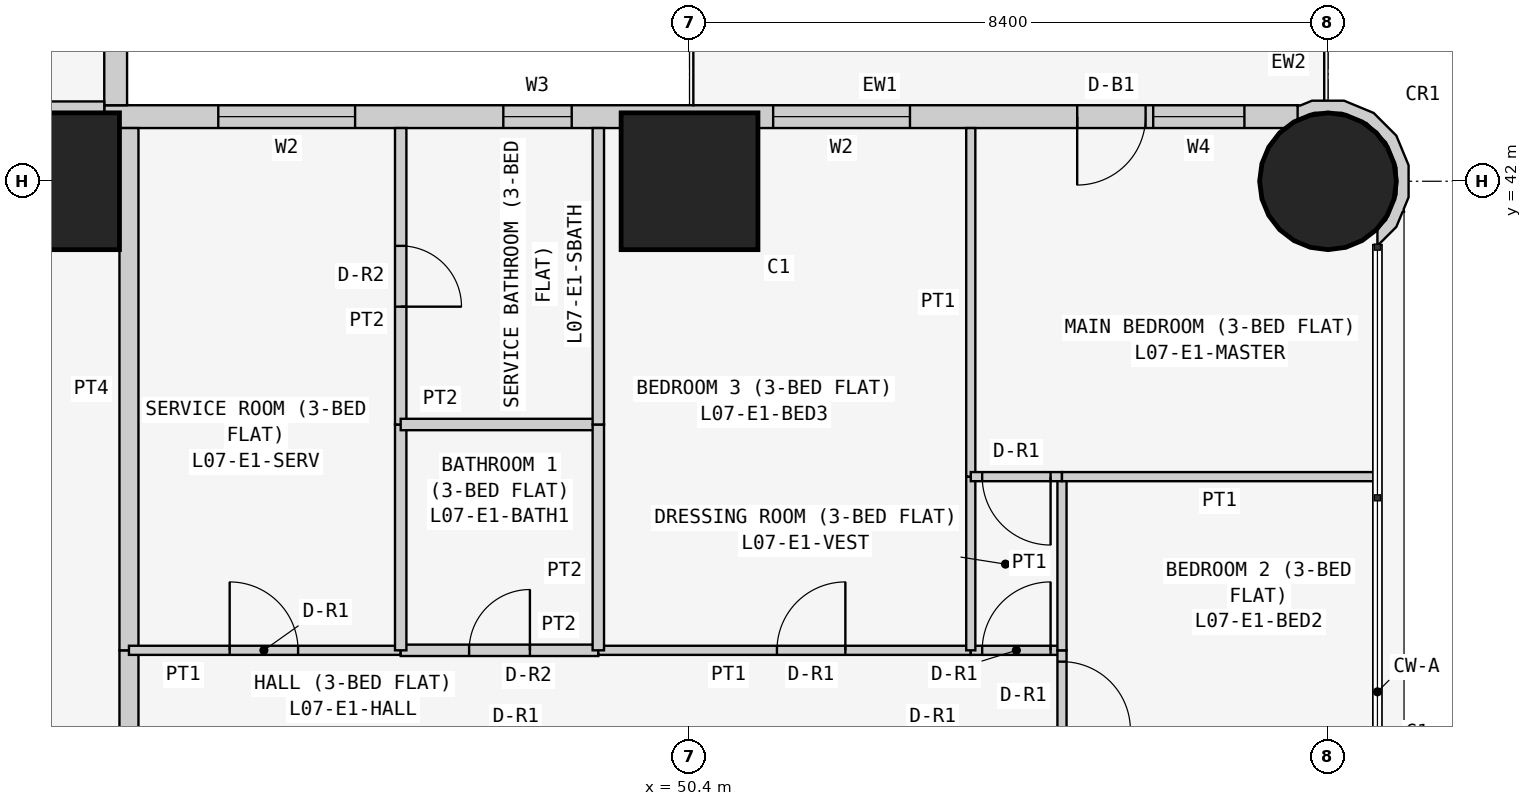
"""IFC4 building model, lengths in metres.
Left out: names, types, materials, properties, quantities, classifications, styles, units other than length and angle.
Written with IfcOpenShell. Run it as: python <this file> out.ifc"""

import sys

from ifc_helpers import new_model, si_unit, direction, frame, frame_2d, origin, origin_2d, place, context, subcontext, project, spatial, polyline, rectangle, circle, outline, extrude, element, fill, save


model = new_model("IFC4")
c1 = context("Model", 3, precision=1e-05, world=origin(), true_north=direction((0.0, 1.0)))
c2 = subcontext(c1, "Body", "Model", "MODEL_VIEW")
j1 = project(units=[si_unit("LENGTHUNIT", "METRE"), si_unit("PLANEANGLEUNIT", "RADIAN")], contexts=[c1])
p1 = place(None, origin())
s1 = spatial("IfcSite", under=j1, at=p1, CompositionType="ELEMENT")
p2 = place(p1, origin())
s2 = spatial("IfcBuilding", under=s1, at=p2, CompositionType="ELEMENT")
p3 = place(p2, frame((0.0, 0.0, 34.5)))
s3 = spatial("IfcBuildingStorey", under=s2, at=p3, CompositionType="ELEMENT", Elevation=34.5)
for number, where, z_axis, x_axis in (
    (1, (42.0, 42.0, 0.0), (0.0, 0.0, 1.0), (1.0, 0.0, 0.0)),
    (2, (50.4, 42.0, 0.0), (0.0, 0.0, 1.0), (1.0, 0.0, 0.0)),
):
    element("IfcColumn", number, at=place(p3, frame(where, z_axis=z_axis, x_axis=x_axis)), inside=s3, PredefinedType="COLUMN", context=c2, shape_type="SweptSolid", body=[
        extrude(rectangle(XDim=1.8, YDim=1.8, at=origin_2d()), origin(), (0.0, 0.0, 1.0), 3.6),
    ])
p4 = place(p3, frame((58.8, 42.0, 0.0), z_axis=(0.0, 0.0, 1.0), x_axis=(1.0, 0.0, 0.0)))
e3 = element("IfcColumn", 3, at=p4, inside=s3, PredefinedType="COLUMN", context=c2, shape_type="SweptSolid", body=[
    extrude(circle(Radius=0.9, at=origin_2d()), origin(), (0.0, 0.0, 1.0), 3.6),
])
p5 = place(p3, frame((58.4, 42.85, 0.0), z_axis=(0.0, 0.0, 1.0), x_axis=(-1.0, 0.0, 0.0)))
e4 = element("IfcWall", 4, at=p5, inside=s3, PredefinedType="SOLIDWALL", context=c2, shape_type="SweptSolid", body=[
    extrude(rectangle(XDim=15.7, YDim=0.3, at=frame_2d((7.85, 0.0))), origin(), (0.0, 0.0, 1.0), 3.45),
])
p6 = place(p5, frame((12.4, 0.0, 0.9)))
e5 = element("IfcOpeningElement", 5, at=p6, cuts=e4, PredefinedType="OPENING", context=c2, shape_type="SweptSolid", body=[
    extrude(rectangle(XDim=1.8, YDim=1.5, at=frame_2d((0.9, 0.75))), frame((0.0, 0.16, 0.0), z_axis=(0.0, -1.0, 0.0), x_axis=(1.0, 0.0, 0.0)), (0.0, 0.0, 1.0), 0.32),
])
p7 = place(p5, frame((9.55, 0.0, 1.5)))
e6 = element("IfcOpeningElement", 6, at=p7, cuts=e4, PredefinedType="OPENING", context=c2, shape_type="SweptSolid", body=[
    extrude(rectangle(XDim=0.9, YDim=0.7, at=frame_2d((0.45, 0.35))), frame((0.0, 0.16, 0.0), z_axis=(0.0, -1.0, 0.0), x_axis=(1.0, 0.0, 0.0)), (0.0, 0.0, 1.0), 0.32),
])
p8 = place(p5, frame((5.1, 0.0, 0.9)))
e7 = element("IfcOpeningElement", 7, at=p8, cuts=e4, PredefinedType="OPENING", context=c2, shape_type="SweptSolid", body=[
    extrude(rectangle(XDim=1.8, YDim=1.5, at=frame_2d((0.9, 0.75))), frame((0.0, 0.16, 0.0), z_axis=(0.0, -1.0, 0.0), x_axis=(1.0, 0.0, 0.0)), (0.0, 0.0, 1.0), 0.32),
])
p9 = place(p5, frame((2.0, 0.0, 0.0)))
e8 = element("IfcOpeningElement", 8, at=p9, cuts=e4, PredefinedType="OPENING", context=c2, shape_type="SweptSolid", body=[
    extrude(rectangle(XDim=0.9, YDim=2.4, at=frame_2d((0.45, 1.2))), frame((0.0, 0.16, 0.0), z_axis=(0.0, -1.0, 0.0), x_axis=(1.0, 0.0, 0.0)), (0.0, 0.0, 1.0), 0.32),
])
p10 = place(p5, frame((0.7, 0.0, 0.9)))
e9 = element("IfcOpeningElement", 9, at=p10, cuts=e4, PredefinedType="OPENING", context=c2, shape_type="SweptSolid", body=[
    extrude(rectangle(XDim=1.2, YDim=1.5, at=frame_2d((0.6, 0.75))), frame((0.0, 0.16, 0.0), z_axis=(0.0, -1.0, 0.0), x_axis=(1.0, 0.0, 0.0)), (0.0, 0.0, 1.0), 0.32),
])
p11 = place(p3, frame((42.85, 43.0, 0.0), z_axis=(0.0, 0.0, 1.0), x_axis=(0.0, 1.0, 0.0)))
e10 = element("IfcWall", 10, at=p11, inside=s3, PredefinedType="SOLIDWALL", context=c2, shape_type="SweptSolid", body=[
    extrude(rectangle(XDim=15.4, YDim=0.3, at=frame_2d((7.7, 0.0))), origin(), (0.0, 0.0, 1.0), 3.45),
])
p12 = place(p11, frame((1.2, 0.0, 0.9)))
e11 = element("IfcOpeningElement", 11, at=p12, cuts=e10, PredefinedType="OPENING", context=c2, shape_type="SweptSolid", body=[
    extrude(rectangle(XDim=1.8, YDim=1.5, at=frame_2d((0.9, 0.75))), frame((0.0, 0.16, 0.0), z_axis=(0.0, -1.0, 0.0), x_axis=(1.0, 0.0, 0.0)), (0.0, 0.0, 1.0), 0.32),
])
p13 = place(p11, frame((4.95, 0.0, 1.5)))
e12 = element("IfcOpeningElement", 12, at=p13, cuts=e10, PredefinedType="OPENING", context=c2, shape_type="SweptSolid", body=[
    extrude(rectangle(XDim=0.9, YDim=0.7, at=frame_2d((0.45, 0.35))), frame((0.0, 0.16, 0.0), z_axis=(0.0, -1.0, 0.0), x_axis=(1.0, 0.0, 0.0)), (0.0, 0.0, 1.0), 0.32),
])
p14 = place(p11, frame((8.5, 0.0, 0.9)))
e13 = element("IfcOpeningElement", 13, at=p14, cuts=e10, PredefinedType="OPENING", context=c2, shape_type="SweptSolid", body=[
    extrude(rectangle(XDim=1.8, YDim=1.5, at=frame_2d((0.9, 0.75))), frame((0.0, 0.16, 0.0), z_axis=(0.0, -1.0, 0.0), x_axis=(1.0, 0.0, 0.0)), (0.0, 0.0, 1.0), 0.32),
])
p15 = place(p11, frame((12.5, 0.0, 0.0)))
e14 = element("IfcOpeningElement", 14, at=p15, cuts=e10, PredefinedType="OPENING", context=c2, shape_type="SweptSolid", body=[
    extrude(rectangle(XDim=0.9, YDim=2.4, at=frame_2d((0.45, 1.2))), frame((0.0, 0.16, 0.0), z_axis=(0.0, -1.0, 0.0), x_axis=(1.0, 0.0, 0.0)), (0.0, 0.0, 1.0), 0.32),
])
p16 = place(p11, frame((13.5, 0.0, 0.9)))
e15 = element("IfcOpeningElement", 15, at=p16, cuts=e10, PredefinedType="OPENING", context=c2, shape_type="SweptSolid", body=[
    extrude(rectangle(XDim=1.2, YDim=1.5, at=frame_2d((0.6, 0.75))), frame((0.0, 0.16, 0.0), z_axis=(0.0, -1.0, 0.0), x_axis=(1.0, 0.0, 0.0)), (0.0, 0.0, 1.0), 0.32),
])
p17 = place(p3, frame((59.411, 41.233, 0.0), z_axis=(0.0, 0.0, 1.0), x_axis=(0.926129809145, 0.377204953059, 0.0)))
e16 = element("IfcWall", 16, at=p17, inside=s3, PredefinedType="SOLIDWALL", context=c2, shape_type="SweptSolid", body=[
    extrude(outline(polyline([(0.626, 0.345), (0.785, 0.736), (0.782, 1.157), (0.619, 1.546), (0.319, 1.843), (-0.072, 2.002), (-0.24, 2.001), (-0.27, 2.017), (-0.37, 1.841), (-0.102, 1.842), (0.23, 1.707), (0.485, 1.455), (0.624, 1.125), (0.626, 0.766), (0.491, 0.434), (0.238, 0.179), (0.09, 0.117), (0.011, -0.078), (0.024, -0.083), (0.329, 0.045), (0.48, 0.198), (0.499, 0.193), (0.508, 0.225), (0.626, 0.345)])), origin(), (0.0, 0.0, 1.0), 3.45),
])
p18 = place(p3, frame((31.143, 42.975, 0.0), z_axis=(0.0, 0.0, 1.0), x_axis=(1.0, 0.0, 0.0)))
e17 = element("IfcWall", 17, at=p18, inside=s3, PredefinedType="PARTITIONING", context=c2, shape_type="SweptSolid", body=[
    extrude(rectangle(XDim=11.557, YDim=0.15, at=frame_2d((5.778, 0.0))), origin(), (0.0, 0.0, 1.0), 3.45),
])
p19 = place(p3, frame((43.025, 35.829, 0.0), z_axis=(0.0, 0.0, 1.0), x_axis=(0.0, -1.0, 0.0)))
e18 = element("IfcWall", 18, at=p19, inside=s3, PredefinedType="PARTITIONING", context=c2, shape_type="SweptSolid", body=[
    extrude(rectangle(XDim=1.2, YDim=0.25, at=frame_2d((0.6, 0.0))), origin(), (0.0, 0.0, 1.0), 3.45),
])
p20 = place(p3, frame((43.025, 42.7, 0.0), z_axis=(0.0, 0.0, 1.0), x_axis=(0.0, -1.0, 0.0)))
e19 = element("IfcWall", 19, at=p20, inside=s3, PredefinedType="PARTITIONING", context=c2, shape_type="SweptSolid", body=[
    extrude(rectangle(XDim=6.871, YDim=0.25, at=frame_2d((3.436, 0.0))), origin(), (0.0, 0.0, 1.0), 3.45),
])
p21 = place(p3, frame((46.6, 35.829, 0.0), z_axis=(0.0, 0.0, 1.0), x_axis=(-1.0, 0.0, 0.0)))
e20 = element("IfcWall", 20, at=p21, inside=s3, PredefinedType="PARTITIONING", context=c2, shape_type="SweptSolid", body=[
    extrude(rectangle(XDim=3.575, YDim=0.12, at=frame_2d((1.788, 0.0))), origin(), (0.0, 0.0, 1.0), 3.45),
])
p22 = place(p21, frame((1.35, 0.0, 0.0)))
e21 = element("IfcOpeningElement", 21, at=p22, cuts=e20, PredefinedType="OPENING", context=c2, shape_type="SweptSolid", body=[
    extrude(rectangle(XDim=0.9, YDim=2.1, at=frame_2d((0.45, 1.05))), frame((0.0, 0.07, 0.0), z_axis=(0.0, -1.0, 0.0), x_axis=(1.0, 0.0, 0.0)), (0.0, 0.0, 1.0), 0.14),
])
p23 = place(p3, frame((49.2, 35.829, 0.0), z_axis=(0.0, 0.0, 1.0), x_axis=(-1.0, 0.0, 0.0)))
e22 = element("IfcWall", 22, at=p23, inside=s3, PredefinedType="PARTITIONING", context=c2, shape_type="SweptSolid", body=[
    extrude(rectangle(XDim=2.6, YDim=0.15, at=frame_2d((1.3, 0.0))), origin(), (0.0, 0.0, 1.0), 3.45),
])
p24 = place(p23, frame((0.9, 0.0, 0.0)))
e23 = element("IfcOpeningElement", 23, at=p24, cuts=e22, PredefinedType="OPENING", context=c2, shape_type="SweptSolid", body=[
    extrude(rectangle(XDim=0.8, YDim=2.1, at=frame_2d((0.4, 1.05))), frame((0.0, 0.085, 0.0), z_axis=(0.0, -1.0, 0.0), x_axis=(1.0, 0.0, 0.0)), (0.0, 0.0, 1.0), 0.17),
])
p25 = place(p3, frame((54.1, 35.829, 0.0), z_axis=(0.0, 0.0, 1.0), x_axis=(-1.0, 0.0, 0.0)))
e24 = element("IfcWall", 24, at=p25, inside=s3, PredefinedType="PARTITIONING", context=c2, shape_type="SweptSolid", body=[
    extrude(rectangle(XDim=4.9, YDim=0.12, at=frame_2d((2.45, 0.0))), origin(), (0.0, 0.0, 1.0), 3.45),
])
p26 = place(p25, frame((1.65, 0.0, 0.0)))
e25 = element("IfcOpeningElement", 25, at=p26, cuts=e24, PredefinedType="OPENING", context=c2, shape_type="SweptSolid", body=[
    extrude(rectangle(XDim=0.9, YDim=2.1, at=frame_2d((0.45, 1.05))), frame((0.0, 0.07, 0.0), z_axis=(0.0, -1.0, 0.0), x_axis=(1.0, 0.0, 0.0)), (0.0, 0.0, 1.0), 0.14),
])
p27 = place(p3, frame((55.3, 35.829, 0.0), z_axis=(0.0, 0.0, 1.0), x_axis=(-1.0, 0.0, 0.0)))
e26 = element("IfcWall", 26, at=p27, inside=s3, PredefinedType="PARTITIONING", context=c2, shape_type="SweptSolid", body=[
    extrude(rectangle(XDim=1.2, YDim=0.12, at=frame_2d((0.6, 0.0))), origin(), (0.0, 0.0, 1.0), 3.45),
])
p28 = place(p27, frame((0.15, 0.0, 0.0)))
e27 = element("IfcOpeningElement", 27, at=p28, cuts=e26, PredefinedType="OPENING", context=c2, shape_type="SweptSolid", body=[
    extrude(rectangle(XDim=0.9, YDim=2.1, at=frame_2d((0.45, 1.05))), frame((0.0, 0.07, 0.0), z_axis=(0.0, -1.0, 0.0), x_axis=(1.0, 0.0, 0.0)), (0.0, 0.0, 1.0), 0.14),
])
p29 = place(p3, frame((55.3, 34.629, 0.0), z_axis=(0.0, 0.0, 1.0), x_axis=(0.0, 1.0, 0.0)))
e28 = element("IfcWall", 28, at=p29, inside=s3, PredefinedType="PARTITIONING", context=c2, shape_type="SweptSolid", body=[
    extrude(rectangle(XDim=1.2, YDim=0.12, at=frame_2d((0.6, 0.0))), origin(), (0.0, 0.0, 1.0), 3.45),
])
p30 = place(p29, frame((0.151, 0.0, 0.0)))
e29 = element("IfcOpeningElement", 29, at=p30, cuts=e28, PredefinedType="OPENING", context=c2, shape_type="SweptSolid", body=[
    extrude(rectangle(XDim=0.9, YDim=2.1, at=frame_2d((0.45, 1.05))), frame((0.0, 0.07, 0.0), z_axis=(0.0, -1.0, 0.0), x_axis=(1.0, 0.0, 0.0)), (0.0, 0.0, 1.0), 0.14),
])
p31 = place(p3, frame((46.6, 35.829, 0.0), z_axis=(0.0, 0.0, 1.0), x_axis=(0.0, 1.0, 0.0)))
e30 = element("IfcWall", 30, at=p31, inside=s3, PredefinedType="PARTITIONING", context=c2, shape_type="SweptSolid", body=[
    extrude(rectangle(XDim=2.971, YDim=0.15, at=frame_2d((1.485, 0.0))), origin(), (0.0, 0.0, 1.0), 3.45),
])
p32 = place(p3, frame((46.6, 38.8, 0.0), z_axis=(0.0, 0.0, 1.0), x_axis=(0.0, 1.0, 0.0)))
e31 = element("IfcWall", 31, at=p32, inside=s3, PredefinedType="PARTITIONING", context=c2, shape_type="SweptSolid", body=[
    extrude(rectangle(XDim=3.9, YDim=0.15, at=frame_2d((1.95, 0.0))), origin(), (0.0, 0.0, 1.0), 3.45),
])
p33 = place(p32, frame((1.55, 0.0, 0.0)))
e32 = element("IfcOpeningElement", 32, at=p33, cuts=e31, PredefinedType="OPENING", context=c2, shape_type="SweptSolid", body=[
    extrude(rectangle(XDim=0.8, YDim=2.1, at=frame_2d((0.4, 1.05))), frame((0.0, 0.085, 0.0), z_axis=(0.0, -1.0, 0.0), x_axis=(1.0, 0.0, 0.0)), (0.0, 0.0, 1.0), 0.17),
])
p34 = place(p3, frame((49.2, 38.8, 0.0), z_axis=(0.0, 0.0, 1.0), x_axis=(-1.0, 0.0, 0.0)))
e33 = element("IfcWall", 33, at=p34, inside=s3, PredefinedType="PARTITIONING", context=c2, shape_type="SweptSolid", body=[
    extrude(rectangle(XDim=2.6, YDim=0.15, at=frame_2d((1.3, 0.0))), origin(), (0.0, 0.0, 1.0), 3.45),
])
p35 = place(p3, frame((49.2, 35.829, 0.0), z_axis=(0.0, 0.0, 1.0), x_axis=(0.0, 1.0, 0.0)))
e34 = element("IfcWall", 34, at=p35, inside=s3, PredefinedType="PARTITIONING", context=c2, shape_type="SweptSolid", body=[
    extrude(rectangle(XDim=2.971, YDim=0.15, at=frame_2d((1.485, 0.0))), origin(), (0.0, 0.0, 1.0), 3.45),
])
p36 = place(p3, frame((49.2, 38.8, 0.0), z_axis=(0.0, 0.0, 1.0), x_axis=(0.0, 1.0, 0.0)))
e35 = element("IfcWall", 35, at=p36, inside=s3, PredefinedType="PARTITIONING", context=c2, shape_type="SweptSolid", body=[
    extrude(rectangle(XDim=3.9, YDim=0.15, at=frame_2d((1.95, 0.0))), origin(), (0.0, 0.0, 1.0), 3.45),
])
p37 = place(p3, frame((54.1, 35.829, 0.0), z_axis=(0.0, 0.0, 1.0), x_axis=(0.0, 1.0, 0.0)))
e36 = element("IfcWall", 36, at=p37, inside=s3, PredefinedType="PARTITIONING", context=c2, shape_type="SweptSolid", body=[
    extrude(rectangle(XDim=2.285, YDim=0.12, at=frame_2d((1.143, 0.0))), origin(), (0.0, 0.0, 1.0), 3.45),
])
p38 = place(p3, frame((54.1, 38.114, 0.0), z_axis=(0.0, 0.0, 1.0), x_axis=(0.0, 1.0, 0.0)))
e37 = element("IfcWall", 37, at=p38, inside=s3, PredefinedType="PARTITIONING", context=c2, shape_type="SweptSolid", body=[
    extrude(rectangle(XDim=4.586, YDim=0.12, at=frame_2d((2.293, 0.0))), origin(), (0.0, 0.0, 1.0), 3.45),
])
p39 = place(p3, frame((55.3, 35.829, 0.0), z_axis=(0.0, 0.0, 1.0), x_axis=(0.0, 1.0, 0.0)))
e38 = element("IfcWall", 38, at=p39, inside=s3, PredefinedType="PARTITIONING", context=c2, shape_type="SweptSolid", body=[
    extrude(rectangle(XDim=2.285, YDim=0.12, at=frame_2d((1.143, 0.0))), origin(), (0.0, 0.0, 1.0), 3.45),
])
p40 = place(p3, frame((55.3, 38.114, 0.0), z_axis=(0.0, 0.0, 1.0), x_axis=(-1.0, 0.0, 0.0)))
e39 = element("IfcWall", 39, at=p40, inside=s3, PredefinedType="PARTITIONING", context=c2, shape_type="SweptSolid", body=[
    extrude(rectangle(XDim=1.2, YDim=0.12, at=frame_2d((0.6, 0.0))), origin(), (0.0, 0.0, 1.0), 3.45),
])
p41 = place(p40, frame((0.15, 0.0, 0.0)))
e40 = element("IfcOpeningElement", 40, at=p41, cuts=e39, PredefinedType="OPENING", context=c2, shape_type="SweptSolid", body=[
    extrude(rectangle(XDim=0.9, YDim=2.1, at=frame_2d((0.45, 1.05))), frame((0.0, 0.07, 0.0), z_axis=(0.0, -1.0, 0.0), x_axis=(1.0, 0.0, 0.0)), (0.0, 0.0, 1.0), 0.14),
])
p42 = place(p3, frame((59.45, 38.114, 0.0), z_axis=(0.0, 0.0, 1.0), x_axis=(-1.0, 0.0, 0.0)))
e41 = element("IfcWall", 41, at=p42, inside=s3, PredefinedType="PARTITIONING", context=c2, shape_type="SweptSolid", body=[
    extrude(rectangle(XDim=4.15, YDim=0.12, at=frame_2d((2.075, 0.0))), origin(), (0.0, 0.0, 1.0), 3.45),
])
p43 = place(p6, origin())
e42 = element("IfcWindow", 42, at=p43, inside=s3, PartitioningType="SINGLE_PANEL", PredefinedType="WINDOW", context=c2, shape_type="SweptSolid", body=[
    extrude(rectangle(XDim=1.8, YDim=1.5, at=frame_2d((0.9, 0.75))), frame((0.0, 0.03, 0.0), z_axis=(0.0, -1.0, 0.0), x_axis=(1.0, 0.0, 0.0)), (0.0, 0.0, 1.0), 0.06),
])
fill(e5, e42)
p44 = place(p7, origin())
e43 = element("IfcWindow", 43, at=p44, inside=s3, PartitioningType="SINGLE_PANEL", PredefinedType="WINDOW", context=c2, shape_type="SweptSolid", body=[
    extrude(rectangle(XDim=0.9, YDim=0.7, at=frame_2d((0.45, 0.35))), frame((0.0, 0.03, 0.0), z_axis=(0.0, -1.0, 0.0), x_axis=(1.0, 0.0, 0.0)), (0.0, 0.0, 1.0), 0.06),
])
fill(e6, e43)
p45 = place(p8, origin())
e44 = element("IfcWindow", 44, at=p45, inside=s3, PartitioningType="SINGLE_PANEL", PredefinedType="WINDOW", context=c2, shape_type="SweptSolid", body=[
    extrude(rectangle(XDim=1.8, YDim=1.5, at=frame_2d((0.9, 0.75))), frame((0.0, 0.03, 0.0), z_axis=(0.0, -1.0, 0.0), x_axis=(1.0, 0.0, 0.0)), (0.0, 0.0, 1.0), 0.06),
])
fill(e7, e44)
p46 = place(p9, origin())
e45 = element("IfcDoor", 45, at=p46, inside=s3, OperationType="SINGLE_SWING_RIGHT", PredefinedType="DOOR", context=c2, shape_type="SweptSolid", body=[
    extrude(rectangle(XDim=0.9, YDim=2.4, at=frame_2d((0.45, 1.2))), frame((0.0, 0.025, 0.0), z_axis=(0.0, -1.0, 0.0), x_axis=(1.0, 0.0, 0.0)), (0.0, 0.0, 1.0), 0.05),
])
fill(e8, e45)
p47 = place(p10, origin())
e46 = element("IfcWindow", 46, at=p47, inside=s3, PartitioningType="SINGLE_PANEL", PredefinedType="WINDOW", context=c2, shape_type="SweptSolid", body=[
    extrude(rectangle(XDim=1.2, YDim=1.5, at=frame_2d((0.6, 0.75))), frame((0.0, 0.03, 0.0), z_axis=(0.0, -1.0, 0.0), x_axis=(1.0, 0.0, 0.0)), (0.0, 0.0, 1.0), 0.06),
])
fill(e9, e46)
p48 = place(p22, frame((0.9, 0.0, 0.0), z_axis=(0.0, 0.0, 1.0), x_axis=(-1.0, 0.0, 0.0)))
e47 = element("IfcDoor", 47, at=p48, inside=s3, OperationType="SINGLE_SWING_LEFT", PredefinedType="DOOR", context=c2, shape_type="SweptSolid", body=[
    extrude(rectangle(XDim=0.9, YDim=2.1, at=frame_2d((0.45, 1.05))), frame((0.0, 0.025, 0.0), z_axis=(0.0, -1.0, 0.0), x_axis=(1.0, 0.0, 0.0)), (0.0, 0.0, 1.0), 0.05),
])
fill(e21, e47)
p49 = place(p33, frame((0.8, 0.0, 0.0), z_axis=(0.0, 0.0, 1.0), x_axis=(-1.0, 0.0, 0.0)))
e48 = element("IfcDoor", 48, at=p49, inside=s3, OperationType="SINGLE_SWING_RIGHT", PredefinedType="DOOR", context=c2, shape_type="SweptSolid", body=[
    extrude(rectangle(XDim=0.8, YDim=2.1, at=frame_2d((0.4, 1.05))), frame((0.0, 0.025, 0.0), z_axis=(0.0, -1.0, 0.0), x_axis=(1.0, 0.0, 0.0)), (0.0, 0.0, 1.0), 0.05),
])
fill(e32, e48)
p50 = place(p24, frame((0.8, 0.0, 0.0), z_axis=(0.0, 0.0, 1.0), x_axis=(-1.0, 0.0, 0.0)))
e49 = element("IfcDoor", 49, at=p50, inside=s3, OperationType="SINGLE_SWING_RIGHT", PredefinedType="DOOR", context=c2, shape_type="SweptSolid", body=[
    extrude(rectangle(XDim=0.8, YDim=2.1, at=frame_2d((0.4, 1.05))), frame((0.0, 0.025, 0.0), z_axis=(0.0, -1.0, 0.0), x_axis=(1.0, 0.0, 0.0)), (0.0, 0.0, 1.0), 0.05),
])
fill(e23, e49)
p51 = place(p26, frame((0.9, 0.0, 0.0), z_axis=(0.0, 0.0, 1.0), x_axis=(-1.0, 0.0, 0.0)))
e50 = element("IfcDoor", 50, at=p51, inside=s3, OperationType="SINGLE_SWING_RIGHT", PredefinedType="DOOR", context=c2, shape_type="SweptSolid", body=[
    extrude(rectangle(XDim=0.9, YDim=2.1, at=frame_2d((0.45, 1.05))), frame((0.0, 0.025, 0.0), z_axis=(0.0, -1.0, 0.0), x_axis=(1.0, 0.0, 0.0)), (0.0, 0.0, 1.0), 0.05),
])
fill(e25, e50)
p52 = place(p28, frame((0.9, 0.0, 0.0), z_axis=(0.0, 0.0, 1.0), x_axis=(-1.0, 0.0, 0.0)))
e51 = element("IfcDoor", 51, at=p52, inside=s3, OperationType="SINGLE_SWING_RIGHT", PredefinedType="DOOR", context=c2, shape_type="SweptSolid", body=[
    extrude(rectangle(XDim=0.9, YDim=2.1, at=frame_2d((0.45, 1.05))), frame((0.0, 0.025, 0.0), z_axis=(0.0, -1.0, 0.0), x_axis=(1.0, 0.0, 0.0)), (0.0, 0.0, 1.0), 0.05),
])
fill(e27, e51)
p53 = place(p41, origin())
e52 = element("IfcDoor", 52, at=p53, inside=s3, OperationType="SINGLE_SWING_LEFT", PredefinedType="DOOR", context=c2, shape_type="SweptSolid", body=[
    extrude(rectangle(XDim=0.9, YDim=2.1, at=frame_2d((0.45, 1.05))), frame((0.0, 0.025, 0.0), z_axis=(0.0, -1.0, 0.0), x_axis=(1.0, 0.0, 0.0)), (0.0, 0.0, 1.0), 0.05),
])
fill(e40, e52)
p54 = place(p30, frame((0.9, 0.0, 0.0), z_axis=(0.0, 0.0, 1.0), x_axis=(-1.0, 0.0, 0.0)))
e53 = element("IfcDoor", 53, at=p54, inside=s3, OperationType="SINGLE_SWING_RIGHT", PredefinedType="DOOR", context=c2, shape_type="SweptSolid", body=[
    extrude(rectangle(XDim=0.9, YDim=2.1, at=frame_2d((0.45, 1.05))), frame((0.0, 0.025, 0.0), z_axis=(0.0, -1.0, 0.0), x_axis=(1.0, 0.0, 0.0)), (0.0, 0.0, 1.0), 0.05),
])
fill(e29, e53)
save(model, sys.argv[1])
